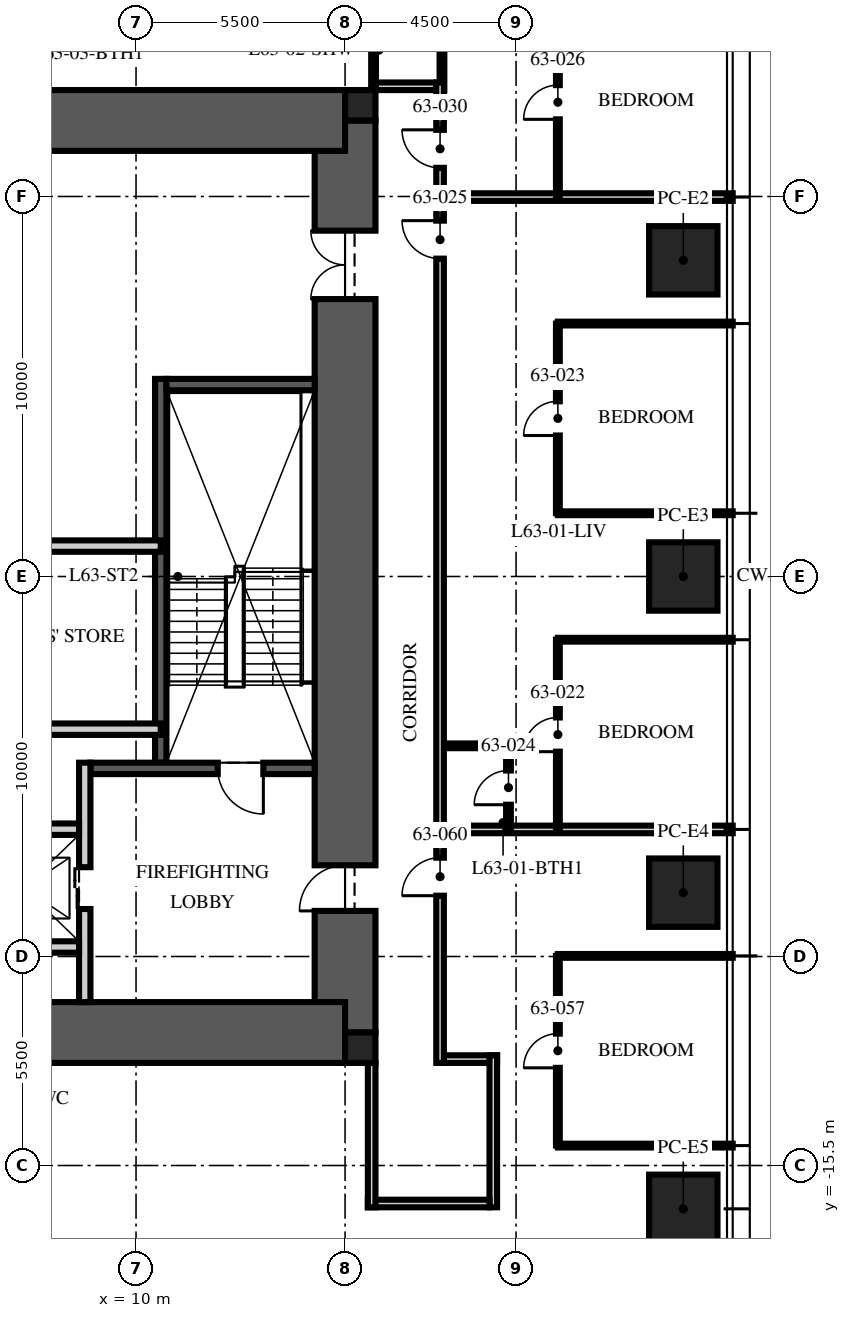
"""IFC4 building model, lengths in metres.
Left out: names, types, materials, properties, quantities, classifications, styles, units other than length and angle.
Written with IfcOpenShell. Run it as: python <this file> out.ifc"""

import sys

from ifc_helpers import new_model, si_unit, direction, frame, frame_2d, origin, origin_2d, place, context, subcontext, project, spatial, rectangle, extrude, element, fill, save


model = new_model("IFC4")
c1 = context("Model", 3, precision=1e-05, world=origin(), true_north=direction((0.0, 1.0)))
c2 = subcontext(c1, "Body", "Model", "MODEL_VIEW")
j1 = project(units=[si_unit("LENGTHUNIT", "METRE"), si_unit("PLANEANGLEUNIT", "RADIAN")], contexts=[c1])
p1 = place(None, origin())
s1 = spatial("IfcSite", under=j1, at=p1, CompositionType="ELEMENT")
p2 = place(p1, origin())
s2 = spatial("IfcBuilding", under=s1, at=p2, CompositionType="ELEMENT")
p3 = place(p2, frame((0.0, 0.0, 252.0)))
s3 = spatial("IfcBuildingStorey", under=s2, at=p3, CompositionType="ELEMENT", Elevation=252.0)
p4 = place(p3, frame((15.5, -12.0, -0.25), z_axis=(0.0, 0.0, 1.0), x_axis=(0.0, 1.0, 0.0)))
e1 = element("IfcWall", 1, at=p4, inside=s3, PredefinedType="SHEAR", context=c2, shape_type="SweptSolid", body=[
    extrude(rectangle(XDim=24.0, YDim=1.6, at=frame_2d((12.0, 0.0))), origin(), (0.0, 0.0, 1.0), 3.75),
])
p5 = place(p4, frame((3.2, 0.0, 0.25)))
e2 = element("IfcOpeningElement", 2, at=p5, cuts=e1, PredefinedType="OPENING", context=c2, shape_type="SweptSolid", body=[
    extrude(rectangle(XDim=1.2, YDim=2.1, at=frame_2d((0.6, 1.05))), frame((0.0, 0.81, 0.0), z_axis=(0.0, -1.0, 0.0), x_axis=(1.0, 0.0, 0.0)), (0.0, 0.0, 1.0), 1.62),
])
p6 = place(p4, frame((19.3, 0.0, 0.25)))
e3 = element("IfcOpeningElement", 3, at=p6, cuts=e1, PredefinedType="OPENING", context=c2, shape_type="SweptSolid", body=[
    extrude(rectangle(XDim=1.8, YDim=2.1, at=frame_2d((0.9, 1.05))), frame((0.0, 0.81, 0.0), z_axis=(0.0, -1.0, 0.0), x_axis=(1.0, 0.0, 0.0)), (0.0, 0.0, 1.0), 1.62),
])
for number, where, z_axis, x_axis in (
    (4, (-15.5, 12.0, -0.25), (0.0, 0.0, 1.0), (1.0, 0.0, 0.0)),
    (5, (-15.5, -12.0, -0.25), (0.0, 0.0, 1.0), (1.0, 0.0, 0.0)),
):
    element("IfcWall", number, at=place(p3, frame(where, z_axis=z_axis, x_axis=x_axis)), inside=s3, PredefinedType="SHEAR", context=c2, shape_type="SweptSolid", body=[
        extrude(rectangle(XDim=31.0, YDim=1.6, at=frame_2d((15.5, 0.0))), origin(), (0.0, 0.0, 1.0), 3.75),
    ])
for number, where, z_axis, x_axis in (
    (6, (15.9, 12.4, -0.25), (0.0, 0.0, 1.0), (1.0, 0.0, 0.0)),
    (7, (15.9, -12.4, -0.25), (0.0, 0.0, 1.0), (1.0, 0.0, 0.0)),
):
    element("IfcColumn", number, at=place(p3, frame(where, z_axis=z_axis, x_axis=x_axis)), inside=s3, PredefinedType="COLUMN", context=c2, shape_type="SweptSolid", body=[
        extrude(rectangle(XDim=0.8, YDim=0.8, at=origin_2d()), origin(), (0.0, 0.0, 1.0), 3.75),
    ])
for number, where, z_axis, x_axis in (
    (8, (24.4, 8.32, 0.0), (0.0, 0.0, 1.0), (0.0, 1.0, 0.0)),
    (9, (24.4, 0.0, 0.0), (0.0, 0.0, 1.0), (0.0, 1.0, 0.0)),
    (10, (24.4, -8.32, 0.0), (0.0, 0.0, 1.0), (0.0, 1.0, 0.0)),
    (11, (24.4, -16.64, 0.0), (0.0, 0.0, 1.0), (0.0, 1.0, 0.0)),
):
    element("IfcColumn", number, at=place(p3, frame(where, z_axis=z_axis, x_axis=x_axis)), inside=s3, PredefinedType="COLUMN", context=c2, shape_type="SweptSolid", body=[
        extrude(rectangle(XDim=1.8, YDim=1.8, at=origin_2d()), origin(), (0.0, 0.0, 1.0), 3.75),
    ])
p7 = place(p3, frame((10.65, -4.9, 0.0), z_axis=(0.0, 0.0, 1.0), x_axis=(0.0, 1.0, 0.0)))
e12 = element("IfcWall", 12, at=p7, inside=s3, PredefinedType="SOLIDWALL", context=c2, shape_type="SweptSolid", body=[
    extrude(rectangle(XDim=10.1, YDim=0.3, at=frame_2d((5.05, 0.0))), origin(), (0.0, 0.0, 1.0), 3.5),
])
p8 = place(p3, frame((14.7, -5.05, 0.0), z_axis=(0.0, 0.0, 1.0), x_axis=(-1.0, 0.0, 0.0)))
e13 = element("IfcWall", 13, at=p8, inside=s3, PredefinedType="SOLIDWALL", context=c2, shape_type="SweptSolid", body=[
    extrude(rectangle(XDim=5.9, YDim=0.3, at=frame_2d((2.95, 0.0))), origin(), (0.0, 0.0, 1.0), 3.5),
])
p9 = place(p8, frame((1.35, 0.0, 0.0)))
e14 = element("IfcOpeningElement", 14, at=p9, cuts=e13, PredefinedType="OPENING", context=c2, shape_type="SweptSolid", body=[
    extrude(rectangle(XDim=1.2, YDim=2.1, at=frame_2d((0.6, 1.05))), frame((0.0, 0.16, 0.0), z_axis=(0.0, -1.0, 0.0), x_axis=(1.0, 0.0, 0.0)), (0.0, 0.0, 1.0), 0.32),
])
p10 = place(p3, frame((14.7, 5.05, 0.0), z_axis=(0.0, 0.0, 1.0), x_axis=(-1.0, 0.0, 0.0)))
e15 = element("IfcWall", 15, at=p10, inside=s3, PredefinedType="SOLIDWALL", context=c2, shape_type="SweptSolid", body=[
    extrude(rectangle(XDim=3.9, YDim=0.3, at=frame_2d((1.95, 0.0))), origin(), (0.0, 0.0, 1.0), 3.5),
])
p11 = place(p3, frame((8.65, -11.2, 0.0), z_axis=(0.0, 0.0, 1.0), x_axis=(0.0, 1.0, 0.0)))
e16 = element("IfcWall", 16, at=p11, inside=s3, PredefinedType="PARTITIONING", context=c2, shape_type="SweptSolid", body=[
    extrude(rectangle(XDim=6.3, YDim=0.3, at=frame_2d((3.15, 0.0))), origin(), (0.0, 0.0, 1.0), 3.5),
])
p12 = place(p11, frame((2.45, 0.0, 0.0)))
e17 = element("IfcOpeningElement", 17, at=p12, cuts=e16, PredefinedType="OPENING", context=c2, shape_type="SweptSolid", body=[
    extrude(rectangle(XDim=1.1, YDim=2.1, at=frame_2d((0.55, 1.05))), frame((0.0, 0.16, 0.0), z_axis=(0.0, -1.0, 0.0), x_axis=(1.0, 0.0, 0.0)), (0.0, 0.0, 1.0), 0.32),
])
p13 = place(p3, frame((-8.5, -6.65, 0.0), z_axis=(0.0, 0.0, 1.0), x_axis=(1.0, 0.0, 0.0)))
e18 = element("IfcWall", 18, at=p13, inside=s3, PredefinedType="PARTITIONING", context=c2, shape_type="SweptSolid", body=[
    extrude(rectangle(XDim=17.0, YDim=0.3, at=frame_2d((8.5, 0.0))), origin(), (0.0, 0.0, 1.0), 3.5),
])
p14 = place(p13, frame((7.8, 0.0, 0.0)))
e19 = element("IfcOpeningElement", 19, at=p14, cuts=e18, PredefinedType="OPENING", context=c2, shape_type="SweptSolid", body=[
    extrude(rectangle(XDim=1.3, YDim=2.4, at=frame_2d((0.65, 1.2))), frame((0.0, 0.16, 0.0), z_axis=(0.0, -1.0, 0.0), x_axis=(1.0, 0.0, 0.0)), (0.0, 0.0, 1.0), 0.32),
])
p15 = place(p13, frame((5.65, 0.0, 0.0)))
e20 = element("IfcOpeningElement", 20, at=p15, cuts=e18, PredefinedType="OPENING", context=c2, shape_type="SweptSolid", body=[
    extrude(rectangle(XDim=0.9, YDim=2.1, at=frame_2d((0.45, 1.05))), frame((0.0, 0.16, 0.0), z_axis=(0.0, -1.0, 0.0), x_axis=(1.0, 0.0, 0.0)), (0.0, 0.0, 1.0), 0.32),
])
p16 = place(p13, frame((10.4, 0.0, 0.0)))
e21 = element("IfcOpeningElement", 21, at=p16, cuts=e18, PredefinedType="OPENING", context=c2, shape_type="SweptSolid", body=[
    extrude(rectangle(XDim=0.9, YDim=2.1, at=frame_2d((0.45, 1.05))), frame((0.0, 0.16, 0.0), z_axis=(0.0, -1.0, 0.0), x_axis=(1.0, 0.0, 0.0)), (0.0, 0.0, 1.0), 0.32),
])
p17 = place(p3, frame((5.6, -9.75, 0.0), z_axis=(0.0, 0.0, 1.0), x_axis=(1.0, 0.0, 0.0)))
e22 = element("IfcWall", 22, at=p17, inside=s3, PredefinedType="PARTITIONING", context=c2, shape_type="SweptSolid", body=[
    extrude(rectangle(XDim=2.9, YDim=0.3, at=frame_2d((1.45, 0.0))), origin(), (0.0, 0.0, 1.0), 3.5),
])
p18 = place(p3, frame((-10.65, 0.8, 0.0), z_axis=(0.0, 0.0, 1.0), x_axis=(1.0, 0.0, 0.0)))
e23 = element("IfcWall", 23, at=p18, inside=s3, PredefinedType="PARTITIONING", context=c2, shape_type="SweptSolid", body=[
    extrude(rectangle(XDim=21.3, YDim=0.3, at=frame_2d((10.65, 0.0))), origin(), (0.0, 0.0, 1.0), 3.5),
])
p19 = place(p18, frame((10.05, 0.0, 0.0)))
e24 = element("IfcOpeningElement", 24, at=p19, cuts=e23, PredefinedType="OPENING", context=c2, shape_type="SweptSolid", body=[
    extrude(rectangle(XDim=1.2, YDim=2.1, at=frame_2d((0.6, 1.05))), frame((0.0, 0.16, 0.0), z_axis=(0.0, -1.0, 0.0), x_axis=(1.0, 0.0, 0.0)), (0.0, 0.0, 1.0), 0.32),
])
p20 = place(p18, frame((0.793, 0.0, 0.0)))
e25 = element("IfcOpeningElement", 25, at=p20, cuts=e23, PredefinedType="OPENING", context=c2, shape_type="SweptSolid", body=[
    extrude(rectangle(XDim=0.9, YDim=2.1, at=frame_2d((0.45, 1.05))), frame((0.0, 0.16, 0.0), z_axis=(0.0, -1.0, 0.0), x_axis=(1.0, 0.0, 0.0)), (0.0, 0.0, 1.0), 0.32),
])
p21 = place(p3, frame((10.65, -4.018, 0.0), z_axis=(0.0, 0.0, 1.0), x_axis=(-1.0, 0.0, 0.0)))
e26 = element("IfcWall", 26, at=p21, inside=s3, PredefinedType="PARTITIONING", context=c2, shape_type="SweptSolid", body=[
    extrude(rectangle(XDim=6.45, YDim=0.3, at=frame_2d((3.225, 0.0))), origin(), (0.0, 0.0, 1.0), 3.5),
])
p22 = place(p3, frame((18.1, -12.7, 0.0), z_axis=(0.0, 0.0, 1.0), x_axis=(1.0, 0.0, 0.0)))
e27 = element("IfcWall", 27, at=p22, inside=s3, PredefinedType="PARTITIONING", context=c2, shape_type="SweptSolid", body=[
    extrude(rectangle(XDim=1.4, YDim=0.2, at=frame_2d((0.7, 0.0))), origin(), (0.0, 0.0, 1.0), 2.81),
])
p23 = place(p3, frame((19.4, -12.6, 0.0), z_axis=(0.0, 0.0, 1.0), x_axis=(0.0, -1.0, 0.0)))
e28 = element("IfcWall", 28, at=p23, inside=s3, PredefinedType="PARTITIONING", context=c2, shape_type="SweptSolid", body=[
    extrude(rectangle(XDim=4.0, YDim=0.2, at=frame_2d((2.0, 0.0))), origin(), (0.0, 0.0, 1.0), 2.6),
])
p24 = place(p3, frame((19.3, -16.5, 0.0), z_axis=(0.0, 0.0, 1.0), x_axis=(-1.0, 0.0, 0.0)))
e29 = element("IfcWall", 29, at=p24, inside=s3, PredefinedType="PARTITIONING", context=c2, shape_type="SweptSolid", body=[
    extrude(rectangle(XDim=3.2, YDim=0.2, at=frame_2d((1.6, 0.0))), origin(), (0.0, 0.0, 1.0), 2.3),
])
p25 = place(p3, frame((16.2, -16.6, 0.0), z_axis=(0.0, 0.0, 1.0), x_axis=(0.0, 1.0, 0.0)))
e30 = element("IfcWall", 30, at=p25, inside=s3, PredefinedType="PARTITIONING", context=c2, shape_type="SweptSolid", body=[
    extrude(rectangle(XDim=3.8, YDim=0.2, at=frame_2d((1.9, 0.0))), origin(), (0.0, 0.0, 1.0), 2.3),
])
p26 = place(p3, frame((16.3, 12.9, 0.0), z_axis=(0.0, 0.0, 1.0), x_axis=(1.0, 0.0, 0.0)))
e31 = element("IfcWall", 31, at=p26, inside=s3, PredefinedType="PARTITIONING", context=c2, shape_type="SweptSolid", body=[
    extrude(rectangle(XDim=1.6, YDim=0.2, at=frame_2d((0.8, 0.0))), origin(), (0.0, 0.0, 1.0), 2.3),
])
p27 = place(p3, frame((18.1, -6.656, 0.0), z_axis=(0.0, 0.0, 1.0), x_axis=(1.0, 0.0, 0.0)))
e32 = element("IfcWall", 32, at=p27, inside=s3, PredefinedType="PARTITIONING", context=c2, shape_type="SweptSolid", body=[
    extrude(rectangle(XDim=7.6, YDim=0.2, at=frame_2d((3.8, 0.0))), origin(), (0.0, 0.0, 1.0), 2.91),
])
for number, where, z_axis, x_axis in (
    (33, (21.1, -1.664, 0.0), (0.0, 0.0, 1.0), (1.0, 0.0, 0.0)),
    (34, (21.1, 1.664, 0.0), (0.0, 0.0, 1.0), (1.0, 0.0, 0.0)),
    (35, (21.1, 6.656, 0.0), (0.0, 0.0, 1.0), (1.0, 0.0, 0.0)),
):
    element("IfcWall", number, at=place(p3, frame(where, z_axis=z_axis, x_axis=x_axis)), inside=s3, PredefinedType="PARTITIONING", context=c2, shape_type="SweptSolid", body=[
        extrude(rectangle(XDim=4.6, YDim=0.1, at=frame_2d((2.3, 0.0))), origin(), (0.0, 0.0, 1.0), 2.91),
    ])
p28 = place(p3, frame((18.1, 9.984, 0.0), z_axis=(0.0, 0.0, 1.0), x_axis=(1.0, 0.0, 0.0)))
e36 = element("IfcWall", 36, at=p28, inside=s3, PredefinedType="PARTITIONING", context=c2, shape_type="SweptSolid", body=[
    extrude(rectangle(XDim=7.6, YDim=0.2, at=frame_2d((3.8, 0.0))), origin(), (0.0, 0.0, 1.0), 2.91),
])
for number, where, z_axis, x_axis in (
    (37, (21.1, -14.976, 0.0), (0.0, 0.0, 1.0), (1.0, 0.0, 0.0)),
    (38, (21.1, -9.984, 0.0), (0.0, 0.0, 1.0), (1.0, 0.0, 0.0)),
):
    element("IfcWall", number, at=place(p3, frame(where, z_axis=z_axis, x_axis=x_axis)), inside=s3, PredefinedType="PARTITIONING", context=c2, shape_type="SweptSolid", body=[
        extrude(rectangle(XDim=4.6, YDim=0.1, at=frame_2d((2.3, 0.0))), origin(), (0.0, 0.0, 1.0), 2.91),
    ])
p29 = place(p3, frame((21.1, -6.656, 0.0), z_axis=(0.0, 0.0, 1.0), x_axis=(0.0, 1.0, 0.0)))
e39 = element("IfcWall", 39, at=p29, inside=s3, PredefinedType="PARTITIONING", context=c2, shape_type="SweptSolid", body=[
    extrude(rectangle(XDim=4.992, YDim=0.1, at=frame_2d((2.496, 0.0))), origin(), (0.0, 0.0, 1.0), 2.81),
])
p30 = place(p29, frame((2.046, 0.0, 0.0)))
e40 = element("IfcOpeningElement", 40, at=p30, cuts=e39, PredefinedType="OPENING", context=c2, shape_type="SweptSolid", body=[
    extrude(rectangle(XDim=0.9, YDim=2.1, at=frame_2d((0.45, 1.05))), frame((0.0, 0.06, 0.0), z_axis=(0.0, -1.0, 0.0), x_axis=(1.0, 0.0, 0.0)), (0.0, 0.0, 1.0), 0.12),
])
p31 = place(p3, frame((21.1, 1.664, 0.0), z_axis=(0.0, 0.0, 1.0), x_axis=(0.0, 1.0, 0.0)))
e41 = element("IfcWall", 41, at=p31, inside=s3, PredefinedType="PARTITIONING", context=c2, shape_type="SweptSolid", body=[
    extrude(rectangle(XDim=4.992, YDim=0.1, at=frame_2d((2.496, 0.0))), origin(), (0.0, 0.0, 1.0), 2.81),
])
p32 = place(p31, frame((2.046, 0.0, 0.0)))
e42 = element("IfcOpeningElement", 42, at=p32, cuts=e41, PredefinedType="OPENING", context=c2, shape_type="SweptSolid", body=[
    extrude(rectangle(XDim=0.9, YDim=2.1, at=frame_2d((0.45, 1.05))), frame((0.0, 0.06, 0.0), z_axis=(0.0, -1.0, 0.0), x_axis=(1.0, 0.0, 0.0)), (0.0, 0.0, 1.0), 0.12),
])
p33 = place(p3, frame((19.8, -6.656, 0.0), z_axis=(0.0, 0.0, 1.0), x_axis=(0.0, 1.0, 0.0)))
e43 = element("IfcWall", 43, at=p33, inside=s3, PredefinedType="PARTITIONING", context=c2, shape_type="SweptSolid", body=[
    extrude(rectangle(XDim=2.2, YDim=0.125, at=frame_2d((1.1, 0.0))), origin(), (0.0, 0.0, 1.0), 3.5),
])
p34 = place(p33, frame((0.65, 0.0, 0.0)))
e44 = element("IfcOpeningElement", 44, at=p34, cuts=e43, PredefinedType="OPENING", context=c2, shape_type="SweptSolid", body=[
    extrude(rectangle(XDim=0.9, YDim=2.1, at=frame_2d((0.45, 1.05))), frame((0.0, 0.073, 0.0), z_axis=(0.0, -1.0, 0.0), x_axis=(1.0, 0.0, 0.0)), (0.0, 0.0, 1.0), 0.145),
])
p35 = place(p3, frame((18.1, -4.456, 0.0), z_axis=(0.0, 0.0, 1.0), x_axis=(1.0, 0.0, 0.0)))
e45 = element("IfcWall", 45, at=p35, inside=s3, PredefinedType="PARTITIONING", context=c2, shape_type="SweptSolid", body=[
    extrude(rectangle(XDim=1.7, YDim=0.125, at=frame_2d((0.85, 0.0))), origin(), (0.0, 0.0, 1.0), 3.5),
])
p36 = place(p3, frame((21.1, 9.984, 0.0), z_axis=(0.0, 0.0, 1.0), x_axis=(0.0, 1.0, 0.0)))
e46 = element("IfcWall", 46, at=p36, inside=s3, PredefinedType="PARTITIONING", context=c2, shape_type="SweptSolid", body=[
    extrude(rectangle(XDim=4.992, YDim=0.1, at=frame_2d((2.496, 0.0))), origin(), (0.0, 0.0, 1.0), 2.81),
])
p37 = place(p36, frame((2.046, 0.0, 0.0)))
e47 = element("IfcOpeningElement", 47, at=p37, cuts=e46, PredefinedType="OPENING", context=c2, shape_type="SweptSolid", body=[
    extrude(rectangle(XDim=0.9, YDim=2.1, at=frame_2d((0.45, 1.05))), frame((0.0, 0.06, 0.0), z_axis=(0.0, -1.0, 0.0), x_axis=(1.0, 0.0, 0.0)), (0.0, 0.0, 1.0), 0.12),
])
for number, where, z_axis, x_axis in (
    (48, (18.05, 12.8, 0.0), (0.0, 0.0, 1.0), (0.0, 1.0, 0.0)),
    (49, (16.25, 12.8, 0.0), (0.0, 0.0, 1.0), (0.0, 1.0, 0.0)),
):
    element("IfcWall", number, at=place(p3, frame(where, z_axis=z_axis, x_axis=x_axis)), inside=s3, PredefinedType="PARTITIONING", context=c2, shape_type="SweptSolid", body=[
        extrude(rectangle(XDim=2.8, YDim=0.125, at=frame_2d((1.4, 0.0))), origin(), (0.0, 0.0, 1.0), 2.3),
    ])
p38 = place(p3, frame((21.1, -14.976, 0.0), z_axis=(0.0, 0.0, 1.0), x_axis=(0.0, 1.0, 0.0)))
e50 = element("IfcWall", 50, at=p38, inside=s3, PredefinedType="PARTITIONING", context=c2, shape_type="SweptSolid", body=[
    extrude(rectangle(XDim=4.992, YDim=0.1, at=frame_2d((2.496, 0.0))), origin(), (0.0, 0.0, 1.0), 2.81),
])
p39 = place(p38, frame((2.046, 0.0, 0.0)))
e51 = element("IfcOpeningElement", 51, at=p39, cuts=e50, PredefinedType="OPENING", context=c2, shape_type="SweptSolid", body=[
    extrude(rectangle(XDim=0.9, YDim=2.1, at=frame_2d((0.45, 1.05))), frame((0.0, 0.06, 0.0), z_axis=(0.0, -1.0, 0.0), x_axis=(1.0, 0.0, 0.0)), (0.0, 0.0, 1.0), 0.12),
])
p40 = place(p3, frame((18.0, -12.8, 0.0), z_axis=(0.0, 0.0, 1.0), x_axis=(0.0, 1.0, 0.0)))
e52 = element("IfcWall", 52, at=p40, inside=s3, PredefinedType="PARTITIONING", context=c2, shape_type="SweptSolid", body=[
    extrude(rectangle(XDim=25.8, YDim=0.2, at=frame_2d((12.9, 0.0))), origin(), (0.0, 0.0, 1.0), 2.6),
])
p41 = place(p40, frame((21.164, 0.0, 0.0)))
e53 = element("IfcOpeningElement", 53, at=p41, cuts=e52, PredefinedType="OPENING", context=c2, shape_type="SweptSolid", body=[
    extrude(rectangle(XDim=1.0, YDim=2.2, at=frame_2d((0.5, 1.1))), frame((0.0, 0.11, 0.0), z_axis=(0.0, -1.0, 0.0), x_axis=(1.0, 0.0, 0.0)), (0.0, 0.0, 1.0), 0.22),
])
p42 = place(p40, frame((23.554, 0.0, 0.0)))
e54 = element("IfcOpeningElement", 54, at=p42, cuts=e52, PredefinedType="OPENING", context=c2, shape_type="SweptSolid", body=[
    extrude(rectangle(XDim=1.0, YDim=2.2, at=frame_2d((0.5, 1.1))), frame((0.0, 0.11, 0.0), z_axis=(0.0, -1.0, 0.0), x_axis=(1.0, 0.0, 0.0)), (0.0, 0.0, 1.0), 0.22),
])
p43 = place(p40, frame((4.4, 0.0, 0.0)))
e55 = element("IfcOpeningElement", 55, at=p43, cuts=e52, PredefinedType="OPENING", context=c2, shape_type="SweptSolid", body=[
    extrude(rectangle(XDim=1.0, YDim=2.2, at=frame_2d((0.5, 1.1))), frame((0.0, 0.11, 0.0), z_axis=(0.0, -1.0, 0.0), x_axis=(1.0, 0.0, 0.0)), (0.0, 0.0, 1.0), 0.22),
])
p44 = place(p9, origin())
e56 = element("IfcDoor", 56, at=p44, inside=s3, OperationType="SINGLE_SWING_LEFT", PredefinedType="DOOR", context=c2, shape_type="SweptSolid", body=[
    extrude(rectangle(XDim=1.2, YDim=2.1, at=frame_2d((0.6, 1.05))), frame((0.0, 0.025, 0.0), z_axis=(0.0, -1.0, 0.0), x_axis=(1.0, 0.0, 0.0)), (0.0, 0.0, 1.0), 0.05),
])
fill(e14, e56)
p45 = place(p5, origin())
e57 = element("IfcDoor", 57, at=p45, inside=s3, OperationType="SINGLE_SWING_LEFT", PredefinedType="DOOR", context=c2, shape_type="SweptSolid", body=[
    extrude(rectangle(XDim=1.2, YDim=2.1, at=frame_2d((0.6, 1.05))), frame((0.0, 0.025, 0.0), z_axis=(0.0, -1.0, 0.0), x_axis=(1.0, 0.0, 0.0)), (0.0, 0.0, 1.0), 0.05),
])
fill(e2, e57)
p46 = place(p6, origin())
e58 = element("IfcDoor", 58, at=p46, inside=s3, OperationType="DOUBLE_DOOR_SINGLE_SWING", PredefinedType="DOOR", context=c2, shape_type="SweptSolid", body=[
    extrude(rectangle(XDim=1.8, YDim=2.1, at=frame_2d((0.9, 1.05))), frame((0.0, 0.025, 0.0), z_axis=(0.0, -1.0, 0.0), x_axis=(1.0, 0.0, 0.0)), (0.0, 0.0, 1.0), 0.05),
])
fill(e3, e58)
p47 = place(p12, origin())
e59 = element("IfcDoor", 59, at=p47, inside=s3, OperationType="DOUBLE_DOOR_SLIDING", PredefinedType="DOOR", context=c2, shape_type="SweptSolid", body=[
    extrude(rectangle(XDim=1.1, YDim=2.1, at=frame_2d((0.55, 1.05))), frame((0.0, 0.025, 0.0), z_axis=(0.0, -1.0, 0.0), x_axis=(1.0, 0.0, 0.0)), (0.0, 0.0, 1.0), 0.05),
])
fill(e17, e59)
p48 = place(p30, origin())
e60 = element("IfcDoor", 60, at=p48, inside=s3, OperationType="SINGLE_SWING_LEFT", PredefinedType="DOOR", context=c2, shape_type="SweptSolid", body=[
    extrude(rectangle(XDim=0.9, YDim=2.1, at=frame_2d((0.45, 1.05))), frame((0.0, 0.025, 0.0), z_axis=(0.0, -1.0, 0.0), x_axis=(1.0, 0.0, 0.0)), (0.0, 0.0, 1.0), 0.05),
])
fill(e40, e60)
p49 = place(p32, origin())
e61 = element("IfcDoor", 61, at=p49, inside=s3, OperationType="SINGLE_SWING_LEFT", PredefinedType="DOOR", context=c2, shape_type="SweptSolid", body=[
    extrude(rectangle(XDim=0.9, YDim=2.1, at=frame_2d((0.45, 1.05))), frame((0.0, 0.025, 0.0), z_axis=(0.0, -1.0, 0.0), x_axis=(1.0, 0.0, 0.0)), (0.0, 0.0, 1.0), 0.05),
])
fill(e42, e61)
p50 = place(p34, origin())
e62 = element("IfcDoor", 62, at=p50, inside=s3, OperationType="SINGLE_SWING_LEFT", PredefinedType="DOOR", context=c2, shape_type="SweptSolid", body=[
    extrude(rectangle(XDim=0.9, YDim=2.1, at=frame_2d((0.45, 1.05))), frame((0.0, 0.025, 0.0), z_axis=(0.0, -1.0, 0.0), x_axis=(1.0, 0.0, 0.0)), (0.0, 0.0, 1.0), 0.05),
])
fill(e44, e62)
p51 = place(p41, origin())
e63 = element("IfcDoor", 63, at=p51, inside=s3, OperationType="SINGLE_SWING_RIGHT", PredefinedType="DOOR", context=c2, shape_type="SweptSolid", body=[
    extrude(rectangle(XDim=1.0, YDim=2.2, at=frame_2d((0.5, 1.1))), frame((0.0, 0.025, 0.0), z_axis=(0.0, -1.0, 0.0), x_axis=(1.0, 0.0, 0.0)), (0.0, 0.0, 1.0), 0.05),
])
fill(e53, e63)
p52 = place(p37, origin())
e64 = element("IfcDoor", 64, at=p52, inside=s3, OperationType="SINGLE_SWING_LEFT", PredefinedType="DOOR", context=c2, shape_type="SweptSolid", body=[
    extrude(rectangle(XDim=0.9, YDim=2.1, at=frame_2d((0.45, 1.05))), frame((0.0, 0.025, 0.0), z_axis=(0.0, -1.0, 0.0), x_axis=(1.0, 0.0, 0.0)), (0.0, 0.0, 1.0), 0.05),
])
fill(e47, e64)
p53 = place(p42, origin())
e65 = element("IfcDoor", 65, at=p53, inside=s3, OperationType="SINGLE_SWING_RIGHT", PredefinedType="DOOR", context=c2, shape_type="SweptSolid", body=[
    extrude(rectangle(XDim=1.0, YDim=2.2, at=frame_2d((0.5, 1.1))), frame((0.0, 0.025, 0.0), z_axis=(0.0, -1.0, 0.0), x_axis=(1.0, 0.0, 0.0)), (0.0, 0.0, 1.0), 0.05),
])
fill(e54, e65)
p54 = place(p39, origin())
e66 = element("IfcDoor", 66, at=p54, inside=s3, OperationType="SINGLE_SWING_LEFT", PredefinedType="DOOR", context=c2, shape_type="SweptSolid", body=[
    extrude(rectangle(XDim=0.9, YDim=2.1, at=frame_2d((0.45, 1.05))), frame((0.0, 0.025, 0.0), z_axis=(0.0, -1.0, 0.0), x_axis=(1.0, 0.0, 0.0)), (0.0, 0.0, 1.0), 0.05),
])
fill(e51, e66)
p55 = place(p43, origin())
e67 = element("IfcDoor", 67, at=p55, inside=s3, OperationType="SINGLE_SWING_LEFT", PredefinedType="DOOR", context=c2, shape_type="SweptSolid", body=[
    extrude(rectangle(XDim=1.0, YDim=2.2, at=frame_2d((0.5, 1.1))), frame((0.0, 0.025, 0.0), z_axis=(0.0, -1.0, 0.0), x_axis=(1.0, 0.0, 0.0)), (0.0, 0.0, 1.0), 0.05),
])
fill(e55, e67)
save(model, sys.argv[1])
